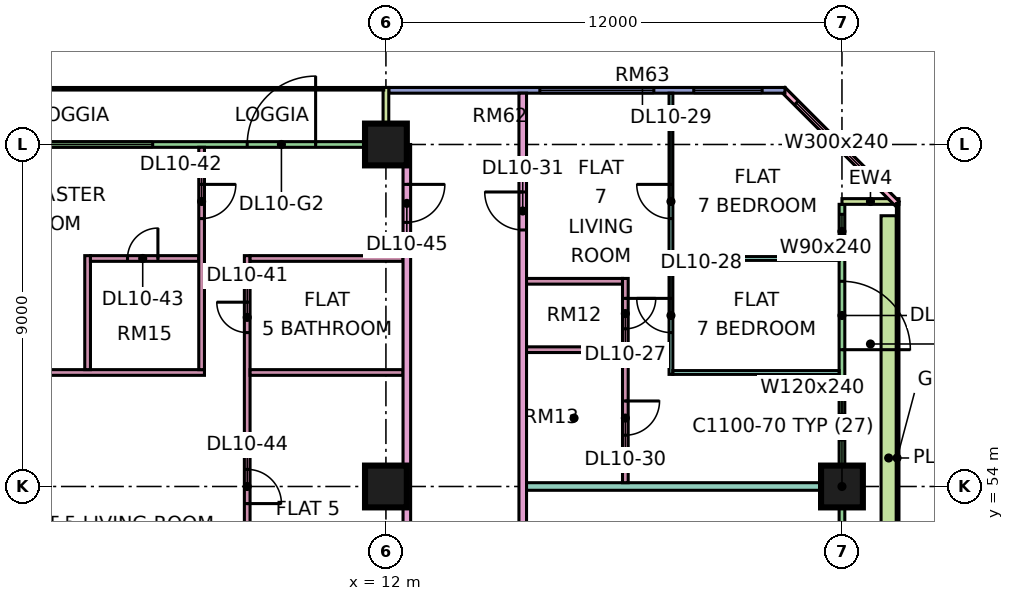
"""IFC4 building model, lengths in metres.
Left out: names, types, materials, properties, quantities, classifications, styles, units other than length and angle.
Written with IfcOpenShell. Run it as: python <this file> out.ifc"""

import sys

from ifc_helpers import new_model, si_unit, direction, frame, frame_2d, origin, origin_2d, place, context, subcontext, project, spatial, rectangle, extrude, element, fill, save


model = new_model("IFC4")
c1 = context("Model", 3, precision=1e-05, world=origin(), true_north=direction((0.0, 1.0)))
c2 = subcontext(c1, "Body", "Model", "MODEL_VIEW")
j1 = project(units=[si_unit("LENGTHUNIT", "METRE"), si_unit("PLANEANGLEUNIT", "RADIAN")], contexts=[c1])
p1 = place(None, origin())
s1 = spatial("IfcSite", under=j1, at=p1, CompositionType="ELEMENT")
p2 = place(p1, origin())
s2 = spatial("IfcBuilding", under=s1, at=p2, CompositionType="ELEMENT")
p3 = place(p2, frame((0.0, 0.0, 52.65)))
s3 = spatial("IfcBuildingStorey", under=s2, at=p3, CompositionType="ELEMENT", Elevation=52.65)
for number, where, z_axis, x_axis in (
    (1, (12.0, 54.0, 0.0), (0.0, 0.0, 1.0), (1.0, 0.0, 0.0)),
    (2, (12.0, 63.0, 0.0), (0.0, 0.0, 1.0), (1.0, 0.0, 0.0)),
    (3, (24.0, 54.0, 0.0), (0.0, 0.0, 1.0), (1.0, 0.0, 0.0)),
):
    element("IfcColumn", number, at=place(p3, frame(where, z_axis=z_axis, x_axis=x_axis)), inside=s3, PredefinedType="COLUMN", context=c2, shape_type="SweptSolid", body=[
        extrude(rectangle(XDim=1.1, YDim=1.1, at=origin_2d()), origin(), (0.0, 0.0, 1.0), 3.75),
    ])
p4 = place(p3, frame((24.0, 48.075, 0.0), z_axis=(0.0, 0.0, 1.0), x_axis=(0.0, 1.0, 0.0)))
e4 = element("IfcWall", 4, at=p4, inside=s3, PredefinedType="SOLIDWALL", context=c2, shape_type="SweptSolid", body=[
    extrude(rectangle(XDim=13.35, YDim=0.15, at=frame_2d((6.675, 0.0))), origin(), (0.0, 0.0, 1.0), 3.35),
])
p5 = place(p4, frame((0.538, 0.0, 0.45)))
e5 = element("IfcOpeningElement", 5, at=p5, cuts=e4, PredefinedType="OPENING", context=c2, shape_type="SweptSolid", body=[
    extrude(rectangle(XDim=4.2, YDim=2.4, at=frame_2d((2.1, 1.2))), frame((0.0, 0.085, 0.0), z_axis=(0.0, -1.0, 0.0), x_axis=(1.0, 0.0, 0.0)), (0.0, 0.0, 1.0), 0.17),
])
p6 = place(p4, frame((7.15, 0.0, 0.45)))
e6 = element("IfcOpeningElement", 6, at=p6, cuts=e4, PredefinedType="OPENING", context=c2, shape_type="SweptSolid", body=[
    extrude(rectangle(XDim=1.2, YDim=2.4, at=frame_2d((0.6, 1.2))), frame((0.0, 0.085, 0.0), z_axis=(0.0, -1.0, 0.0), x_axis=(1.0, 0.0, 0.0)), (0.0, 0.0, 1.0), 0.17),
])
p7 = place(p4, frame((9.525, 0.0, 0.0)))
e7 = element("IfcOpeningElement", 7, at=p7, cuts=e4, PredefinedType="OPENING", context=c2, shape_type="SweptSolid", body=[
    extrude(rectangle(XDim=1.8, YDim=2.4, at=frame_2d((0.9, 1.2))), frame((0.0, 0.085, 0.0), z_axis=(0.0, -1.0, 0.0), x_axis=(1.0, 0.0, 0.0)), (0.0, 0.0, 1.0), 0.17),
])
p8 = place(p4, frame((12.188, 0.0, 0.45)))
e8 = element("IfcOpeningElement", 8, at=p8, cuts=e4, PredefinedType="OPENING", context=c2, shape_type="SweptSolid", body=[
    extrude(rectangle(XDim=0.9, YDim=2.4, at=frame_2d((0.45, 1.2))), frame((0.0, 0.085, 0.0), z_axis=(0.0, -1.0, 0.0), x_axis=(1.0, 0.0, 0.0)), (0.0, 0.0, 1.0), 0.17),
])
p9 = place(p3, frame((25.5, 61.5, 0.0), z_axis=(0.0, 0.0, 1.0), x_axis=(-1.0, 0.0, 0.0)))
e9 = element("IfcWall", 9, at=p9, inside=s3, PredefinedType="SOLIDWALL", context=c2, shape_type="SweptSolid", body=[
    extrude(rectangle(XDim=1.5, YDim=0.15, at=frame_2d((0.75, 0.0))), origin(), (0.0, 0.0, 1.0), 3.35),
])
p10 = place(p3, frame((25.447, 61.447, 0.0), z_axis=(0.0, 0.0, 1.0), x_axis=(-0.707106781187, 0.707106781187, 0.0)))
e10 = element("IfcWall", 10, at=p10, inside=s3, PredefinedType="SOLIDWALL", context=c2, shape_type="SweptSolid", body=[
    extrude(rectangle(XDim=4.243, YDim=0.15, at=frame_2d((2.121, 0.0))), origin(), (0.0, 0.0, 1.0), 3.35),
])
p11 = place(p10, frame((0.744, 0.0, 0.45)))
e11 = element("IfcOpeningElement", 11, at=p11, cuts=e10, PredefinedType="OPENING", context=c2, shape_type="SweptSolid", body=[
    extrude(rectangle(XDim=3.0, YDim=2.4, at=frame_2d((1.5, 1.2))), frame((0.0, 0.085, 0.0), z_axis=(0.0, -1.0, 0.0), x_axis=(1.0, 0.0, 0.0)), (0.0, 0.0, 1.0), 0.17),
])
p12 = place(p3, frame((22.5, 64.425, 0.0), z_axis=(0.0, 0.0, 1.0), x_axis=(-1.0, 0.0, 0.0)))
e12 = element("IfcWall", 12, at=p12, inside=s3, PredefinedType="SOLIDWALL", context=c2, shape_type="SweptSolid", body=[
    extrude(rectangle(XDim=10.425, YDim=0.15, at=frame_2d((5.212, 0.0))), origin(), (0.0, 0.0, 1.0), 3.35),
])
p13 = place(p12, frame((0.6, 0.0, 0.45)))
e13 = element("IfcOpeningElement", 13, at=p13, cuts=e12, PredefinedType="OPENING", context=c2, shape_type="SweptSolid", body=[
    extrude(rectangle(XDim=1.8, YDim=2.4, at=frame_2d((0.9, 1.2))), frame((0.0, 0.085, 0.0), z_axis=(0.0, -1.0, 0.0), x_axis=(1.0, 0.0, 0.0)), (0.0, 0.0, 1.0), 0.17),
])
p14 = place(p12, frame((3.45, 0.0, 0.45)))
e14 = element("IfcOpeningElement", 14, at=p14, cuts=e12, PredefinedType="OPENING", context=c2, shape_type="SweptSolid", body=[
    extrude(rectangle(XDim=3.0, YDim=2.4, at=frame_2d((1.5, 1.2))), frame((0.0, 0.085, 0.0), z_axis=(0.0, -1.0, 0.0), x_axis=(1.0, 0.0, 0.0)), (0.0, 0.0, 1.0), 0.17),
])
p15 = place(p3, frame((11.925, 63.0, 0.0), z_axis=(0.0, 0.0, 1.0), x_axis=(-1.0, 0.0, 0.0)))
e15 = element("IfcWall", 15, at=p15, inside=s3, PredefinedType="SOLIDWALL", context=c2, shape_type="SweptSolid", body=[
    extrude(rectangle(XDim=10.35, YDim=0.15, at=frame_2d((5.175, 0.0))), origin(), (0.0, 0.0, 1.0), 3.35),
])
p16 = place(p15, frame((1.775, 0.0, 0.0)))
e16 = element("IfcOpeningElement", 16, at=p16, cuts=e15, PredefinedType="OPENING", context=c2, shape_type="SweptSolid", body=[
    extrude(rectangle(XDim=1.8, YDim=2.4, at=frame_2d((0.9, 1.2))), frame((0.0, 0.085, 0.0), z_axis=(0.0, -1.0, 0.0), x_axis=(1.0, 0.0, 0.0)), (0.0, 0.0, 1.0), 0.17),
])
p17 = place(p15, frame((6.062, 0.0, 0.45)))
e17 = element("IfcOpeningElement", 17, at=p17, cuts=e15, PredefinedType="OPENING", context=c2, shape_type="SweptSolid", body=[
    extrude(rectangle(XDim=3.0, YDim=2.4, at=frame_2d((1.5, 1.2))), frame((0.0, 0.085, 0.0), z_axis=(0.0, -1.0, 0.0), x_axis=(1.0, 0.0, 0.0)), (0.0, 0.0, 1.0), 0.17),
])
p18 = place(p3, frame((12.0, 64.5, 0.0), z_axis=(0.0, 0.0, 1.0), x_axis=(0.0, -1.0, 0.0)))
e18 = element("IfcWall", 18, at=p18, inside=s3, PredefinedType="SOLIDWALL", context=c2, shape_type="SweptSolid", body=[
    extrude(rectangle(XDim=1.5, YDim=0.15, at=frame_2d((0.75, 0.0))), origin(), (0.0, 0.0, 1.0), 3.35),
])
p19 = place(p3, frame((25.229, 48.375, 0.0), z_axis=(0.0, 0.0, 1.0), x_axis=(0.0, 1.0, 0.0)))
e19 = element("IfcWall", 19, at=p19, inside=s3, PredefinedType="SOLIDWALL", context=c2, shape_type="SweptSolid", body=[
    extrude(rectangle(XDim=12.75, YDim=0.4, at=frame_2d((6.375, 0.0))), origin(), (0.0, 0.0, 1.0), 0.7),
])
p20 = place(p3, frame((0.074, 57.0, 0.0), z_axis=(0.0, 0.0, 1.0), x_axis=(1.0, 0.0, 0.0)))
e20 = element("IfcWall", 20, at=p20, inside=s3, PredefinedType="PARTITIONING", context=c2, shape_type="SweptSolid", body=[
    extrude(rectangle(XDim=7.151, YDim=0.15, at=frame_2d((3.576, 0.0))), origin(), (0.0, 0.0, 1.0), 3.35),
])
p21 = place(p3, frame((4.15, 57.075, 0.0), z_axis=(0.0, 0.0, 1.0), x_axis=(0.0, 1.0, 0.0)))
e21 = element("IfcWall", 21, at=p21, inside=s3, PredefinedType="PARTITIONING", context=c2, shape_type="SweptSolid", body=[
    extrude(rectangle(XDim=3.0, YDim=0.15, at=frame_2d((1.5, 0.0))), origin(), (0.0, 0.0, 1.0), 3.35),
])
p22 = place(p3, frame((4.225, 60.0, 0.0), z_axis=(0.0, 0.0, 1.0), x_axis=(1.0, 0.0, 0.0)))
e22 = element("IfcWall", 22, at=p22, inside=s3, PredefinedType="PARTITIONING", context=c2, shape_type="SweptSolid", body=[
    extrude(rectangle(XDim=2.85, YDim=0.15, at=frame_2d((1.425, 0.0))), origin(), (0.0, 0.0, 1.0), 3.35),
])
p23 = place(p22, frame((0.975, 0.0, 0.0)))
e23 = element("IfcOpeningElement", 23, at=p23, cuts=e22, PredefinedType="OPENING", context=c2, shape_type="SweptSolid", body=[
    extrude(rectangle(XDim=0.8, YDim=2.1, at=frame_2d((0.4, 1.05))), frame((0.0, 0.085, 0.0), z_axis=(0.0, -1.0, 0.0), x_axis=(1.0, 0.0, 0.0)), (0.0, 0.0, 1.0), 0.17),
])
p24 = place(p3, frame((7.15, 57.075, 0.0), z_axis=(0.0, 0.0, 1.0), x_axis=(0.0, 1.0, 0.0)))
e24 = element("IfcWall", 24, at=p24, inside=s3, PredefinedType="PARTITIONING", context=c2, shape_type="SweptSolid", body=[
    extrude(rectangle(XDim=5.851, YDim=0.15, at=frame_2d((2.926, 0.0))), origin(), (0.0, 0.0, 1.0), 3.35),
])
p25 = place(p24, frame((3.975, 0.0, 0.0)))
e25 = element("IfcOpeningElement", 25, at=p25, cuts=e24, PredefinedType="OPENING", context=c2, shape_type="SweptSolid", body=[
    extrude(rectangle(XDim=0.9, YDim=2.1, at=frame_2d((0.45, 1.05))), frame((0.0, 0.085, 0.0), z_axis=(0.0, -1.0, 0.0), x_axis=(1.0, 0.0, 0.0)), (0.0, 0.0, 1.0), 0.17),
])
p26 = place(p3, frame((8.35, 51.1, 0.0), z_axis=(0.0, 0.0, 1.0), x_axis=(0.0, 1.0, 0.0)))
e26 = element("IfcWall", 26, at=p26, inside=s3, PredefinedType="PARTITIONING", context=c2, shape_type="SweptSolid", body=[
    extrude(rectangle(XDim=8.975, YDim=0.15, at=frame_2d((4.487, 0.0))), origin(), (0.0, 0.0, 1.0), 3.35),
])
p27 = place(p26, frame((6.95, 0.0, 0.0)))
e27 = element("IfcOpeningElement", 27, at=p27, cuts=e26, PredefinedType="OPENING", context=c2, shape_type="SweptSolid", body=[
    extrude(rectangle(XDim=0.8, YDim=2.1, at=frame_2d((0.4, 1.05))), frame((0.0, 0.085, 0.0), z_axis=(0.0, -1.0, 0.0), x_axis=(1.0, 0.0, 0.0)), (0.0, 0.0, 1.0), 0.17),
])
p28 = place(p26, frame((2.45, 0.0, 0.0)))
e28 = element("IfcOpeningElement", 28, at=p28, cuts=e26, PredefinedType="OPENING", context=c2, shape_type="SweptSolid", body=[
    extrude(rectangle(XDim=0.9, YDim=2.1, at=frame_2d((0.45, 1.05))), frame((0.0, 0.085, 0.0), z_axis=(0.0, -1.0, 0.0), x_axis=(1.0, 0.0, 0.0)), (0.0, 0.0, 1.0), 0.17),
])
for number, where, z_axis, x_axis in (
    (29, (8.425, 57.0, 0.0), (0.0, 0.0, 1.0), (1.0, 0.0, 0.0)),
    (30, (8.425, 60.0, 0.0), (0.0, 0.0, 1.0), (1.0, 0.0, 0.0)),
):
    element("IfcWall", number, at=place(p3, frame(where, z_axis=z_axis, x_axis=x_axis)), inside=s3, PredefinedType="PARTITIONING", context=c2, shape_type="SweptSolid", body=[
        extrude(rectangle(XDim=4.025, YDim=0.15, at=frame_2d((2.012, 0.0))), origin(), (0.0, 0.0, 1.0), 3.35),
    ])
p29 = place(p3, frame((12.55, 39.225, 0.0), z_axis=(0.0, 0.0, 1.0), x_axis=(0.0, 1.0, 0.0)))
e31 = element("IfcWall", 31, at=p29, inside=s3, PredefinedType="PARTITIONING", context=c2, shape_type="SweptSolid", body=[
    extrude(rectangle(XDim=23.775, YDim=0.2, at=frame_2d((11.887, 0.0))), origin(), (0.0, 0.0, 1.0), 3.35),
])
p30 = place(p29, frame((3.725, 0.0, 0.0)))
e32 = element("IfcOpeningElement", 32, at=p30, cuts=e31, PredefinedType="OPENING", context=c2, shape_type="SweptSolid", body=[
    extrude(rectangle(XDim=1.0, YDim=2.1, at=frame_2d((0.5, 1.05))), frame((0.0, 0.11, 0.0), z_axis=(0.0, -1.0, 0.0), x_axis=(1.0, 0.0, 0.0)), (0.0, 0.0, 1.0), 0.22),
])
p31 = place(p29, frame((21.725, 0.0, 0.0)))
e33 = element("IfcOpeningElement", 33, at=p31, cuts=e31, PredefinedType="OPENING", context=c2, shape_type="SweptSolid", body=[
    extrude(rectangle(XDim=1.0, YDim=2.1, at=frame_2d((0.5, 1.05))), frame((0.0, 0.11, 0.0), z_axis=(0.0, -1.0, 0.0), x_axis=(1.0, 0.0, 0.0)), (0.0, 0.0, 1.0), 0.22),
])
p32 = place(p3, frame((15.6, 51.225, 0.0), z_axis=(0.0, 0.0, 1.0), x_axis=(0.0, 1.0, 0.0)))
e34 = element("IfcWall", 34, at=p32, inside=s3, PredefinedType="PARTITIONING", context=c2, shape_type="SweptSolid", body=[
    extrude(rectangle(XDim=13.125, YDim=0.2, at=frame_2d((6.562, 0.0))), origin(), (0.0, 0.0, 1.0), 3.35),
])
p33 = place(p32, frame((9.525, 0.0, 0.0)))
e35 = element("IfcOpeningElement", 35, at=p33, cuts=e34, PredefinedType="OPENING", context=c2, shape_type="SweptSolid", body=[
    extrude(rectangle(XDim=1.0, YDim=2.1, at=frame_2d((0.5, 1.05))), frame((0.0, 0.11, 0.0), z_axis=(0.0, -1.0, 0.0), x_axis=(1.0, 0.0, 0.0)), (0.0, 0.0, 1.0), 0.22),
])
p34 = place(p3, frame((15.7, 54.0, 0.0), z_axis=(0.0, 0.0, 1.0), x_axis=(1.0, 0.0, 0.0)))
e36 = element("IfcWall", 36, at=p34, inside=s3, PredefinedType="PARTITIONING", context=c2, shape_type="SweptSolid", body=[
    extrude(rectangle(XDim=8.226, YDim=0.2, at=frame_2d((4.113, 0.0))), origin(), (0.0, 0.0, 1.0), 3.35),
])
for number, where, z_axis, x_axis in (
    (37, (15.7, 57.6, 0.0), (0.0, 0.0, 1.0), (1.0, 0.0, 0.0)),
    (38, (15.7, 59.4, 0.0), (0.0, 0.0, 1.0), (1.0, 0.0, 0.0)),
):
    element("IfcWall", number, at=place(p3, frame(where, z_axis=z_axis, x_axis=x_axis)), inside=s3, PredefinedType="PARTITIONING", context=c2, shape_type="SweptSolid", body=[
        extrude(rectangle(XDim=2.525, YDim=0.15, at=frame_2d((1.263, 0.0))), origin(), (0.0, 0.0, 1.0), 3.35),
    ])
p35 = place(p3, frame((18.3, 54.1, 0.0), z_axis=(0.0, 0.0, 1.0), x_axis=(0.0, 1.0, 0.0)))
e39 = element("IfcWall", 39, at=p35, inside=s3, PredefinedType="PARTITIONING", context=c2, shape_type="SweptSolid", body=[
    extrude(rectangle(XDim=5.375, YDim=0.15, at=frame_2d((2.688, 0.0))), origin(), (0.0, 0.0, 1.0), 3.35),
])
p36 = place(p35, frame((4.05, 0.0, 0.0)))
e40 = element("IfcOpeningElement", 40, at=p36, cuts=e39, PredefinedType="OPENING", context=c2, shape_type="SweptSolid", body=[
    extrude(rectangle(XDim=0.8, YDim=2.1, at=frame_2d((0.4, 1.05))), frame((0.0, 0.085, 0.0), z_axis=(0.0, -1.0, 0.0), x_axis=(1.0, 0.0, 0.0)), (0.0, 0.0, 1.0), 0.17),
])
p37 = place(p35, frame((1.25, 0.0, 0.0)))
e41 = element("IfcOpeningElement", 41, at=p37, cuts=e39, PredefinedType="OPENING", context=c2, shape_type="SweptSolid", body=[
    extrude(rectangle(XDim=0.9, YDim=2.1, at=frame_2d((0.45, 1.05))), frame((0.0, 0.085, 0.0), z_axis=(0.0, -1.0, 0.0), x_axis=(1.0, 0.0, 0.0)), (0.0, 0.0, 1.0), 0.17),
])
p38 = place(p3, frame((19.5, 56.95, 0.0), z_axis=(0.0, 0.0, 1.0), x_axis=(0.0, 1.0, 0.0)))
e42 = element("IfcWall", 42, at=p38, inside=s3, PredefinedType="PARTITIONING", context=c2, shape_type="SweptSolid", body=[
    extrude(rectangle(XDim=7.4, YDim=0.1, at=frame_2d((3.7, 0.0))), origin(), (0.0, 0.0, 1.0), 3.35),
])
p39 = place(p38, frame((1.1, 0.0, 0.0)))
e43 = element("IfcOpeningElement", 43, at=p39, cuts=e42, PredefinedType="OPENING", context=c2, shape_type="SweptSolid", body=[
    extrude(rectangle(XDim=0.9, YDim=2.1, at=frame_2d((0.45, 1.05))), frame((0.0, 0.06, 0.0), z_axis=(0.0, -1.0, 0.0), x_axis=(1.0, 0.0, 0.0)), (0.0, 0.0, 1.0), 0.12),
])
p40 = place(p38, frame((4.1, 0.0, 0.0)))
e44 = element("IfcOpeningElement", 44, at=p40, cuts=e42, PredefinedType="OPENING", context=c2, shape_type="SweptSolid", body=[
    extrude(rectangle(XDim=0.9, YDim=2.1, at=frame_2d((0.45, 1.05))), frame((0.0, 0.06, 0.0), z_axis=(0.0, -1.0, 0.0), x_axis=(1.0, 0.0, 0.0)), (0.0, 0.0, 1.0), 0.12),
])
for number, where, z_axis, x_axis in (
    (45, (19.55, 57.0, 0.0), (0.0, 0.0, 1.0), (1.0, 0.0, 0.0)),
    (46, (19.55, 60.0, 0.0), (0.0, 0.0, 1.0), (1.0, 0.0, 0.0)),
):
    element("IfcWall", number, at=place(p3, frame(where, z_axis=z_axis, x_axis=x_axis)), inside=s3, PredefinedType="PARTITIONING", context=c2, shape_type="SweptSolid", body=[
        extrude(rectangle(XDim=4.376, YDim=0.1, at=frame_2d((2.188, 0.0))), origin(), (0.0, 0.0, 1.0), 3.35),
    ])
p41 = place(p6, origin())
e47 = element("IfcWindow", 47, at=p41, inside=s3, PartitioningType="SINGLE_PANEL", PredefinedType="WINDOW", context=c2, shape_type="SweptSolid", body=[
    extrude(rectangle(XDim=1.2, YDim=2.4, at=frame_2d((0.6, 1.2))), frame((0.0, 0.03, 0.0), z_axis=(0.0, -1.0, 0.0), x_axis=(1.0, 0.0, 0.0)), (0.0, 0.0, 1.0), 0.06),
])
fill(e6, e47)
p42 = place(p7, frame((1.8, 0.0, 0.0), z_axis=(0.0, 0.0, 1.0), x_axis=(-1.0, 0.0, 0.0)))
e48 = element("IfcDoor", 48, at=p42, inside=s3, OperationType="DOUBLE_DOOR_SINGLE_SWING", PredefinedType="DOOR", context=c2, shape_type="SweptSolid", body=[
    extrude(rectangle(XDim=1.8, YDim=2.4, at=frame_2d((0.9, 1.2))), frame((0.0, 0.025, 0.0), z_axis=(0.0, -1.0, 0.0), x_axis=(1.0, 0.0, 0.0)), (0.0, 0.0, 1.0), 0.05),
])
fill(e7, e48)
p43 = place(p8, origin())
e49 = element("IfcWindow", 49, at=p43, inside=s3, PartitioningType="SINGLE_PANEL", PredefinedType="WINDOW", context=c2, shape_type="SweptSolid", body=[
    extrude(rectangle(XDim=0.9, YDim=2.4, at=frame_2d((0.45, 1.2))), frame((0.0, 0.03, 0.0), z_axis=(0.0, -1.0, 0.0), x_axis=(1.0, 0.0, 0.0)), (0.0, 0.0, 1.0), 0.06),
])
fill(e8, e49)
p44 = place(p11, origin())
e50 = element("IfcWindow", 50, at=p44, inside=s3, PartitioningType="SINGLE_PANEL", PredefinedType="WINDOW", context=c2, shape_type="SweptSolid", body=[
    extrude(rectangle(XDim=3.0, YDim=2.4, at=frame_2d((1.5, 1.2))), frame((0.0, 0.03, 0.0), z_axis=(0.0, -1.0, 0.0), x_axis=(1.0, 0.0, 0.0)), (0.0, 0.0, 1.0), 0.06),
])
fill(e11, e50)
p45 = place(p13, origin())
e51 = element("IfcWindow", 51, at=p45, inside=s3, PartitioningType="SINGLE_PANEL", PredefinedType="WINDOW", context=c2, shape_type="SweptSolid", body=[
    extrude(rectangle(XDim=1.8, YDim=2.4, at=frame_2d((0.9, 1.2))), frame((0.0, 0.03, 0.0), z_axis=(0.0, -1.0, 0.0), x_axis=(1.0, 0.0, 0.0)), (0.0, 0.0, 1.0), 0.06),
])
fill(e13, e51)
p46 = place(p14, origin())
e52 = element("IfcWindow", 52, at=p46, inside=s3, PartitioningType="SINGLE_PANEL", PredefinedType="WINDOW", context=c2, shape_type="SweptSolid", body=[
    extrude(rectangle(XDim=3.0, YDim=2.4, at=frame_2d((1.5, 1.2))), frame((0.0, 0.03, 0.0), z_axis=(0.0, -1.0, 0.0), x_axis=(1.0, 0.0, 0.0)), (0.0, 0.0, 1.0), 0.06),
])
fill(e14, e52)
p47 = place(p16, frame((1.8, 0.0, 0.0), z_axis=(0.0, 0.0, 1.0), x_axis=(-1.0, 0.0, 0.0)))
e53 = element("IfcDoor", 53, at=p47, inside=s3, OperationType="DOUBLE_DOOR_SINGLE_SWING", PredefinedType="DOOR", context=c2, shape_type="SweptSolid", body=[
    extrude(rectangle(XDim=1.8, YDim=2.4, at=frame_2d((0.9, 1.2))), frame((0.0, 0.025, 0.0), z_axis=(0.0, -1.0, 0.0), x_axis=(1.0, 0.0, 0.0)), (0.0, 0.0, 1.0), 0.05),
])
fill(e16, e53)
p48 = place(p17, origin())
e54 = element("IfcWindow", 54, at=p48, inside=s3, PartitioningType="SINGLE_PANEL", PredefinedType="WINDOW", context=c2, shape_type="SweptSolid", body=[
    extrude(rectangle(XDim=3.0, YDim=2.4, at=frame_2d((1.5, 1.2))), frame((0.0, 0.03, 0.0), z_axis=(0.0, -1.0, 0.0), x_axis=(1.0, 0.0, 0.0)), (0.0, 0.0, 1.0), 0.06),
])
fill(e17, e54)
p49 = place(p36, origin())
e55 = element("IfcDoor", 55, at=p49, inside=s3, OperationType="SINGLE_SWING_RIGHT", PredefinedType="DOOR", context=c2, shape_type="SweptSolid", body=[
    extrude(rectangle(XDim=0.8, YDim=2.1, at=frame_2d((0.4, 1.05))), frame((0.0, 0.025, 0.0), z_axis=(0.0, -1.0, 0.0), x_axis=(1.0, 0.0, 0.0)), (0.0, 0.0, 1.0), 0.05),
])
fill(e40, e55)
p50 = place(p39, frame((0.9, 0.0, 0.0), z_axis=(0.0, 0.0, 1.0), x_axis=(-1.0, 0.0, 0.0)))
e56 = element("IfcDoor", 56, at=p50, inside=s3, OperationType="SINGLE_SWING_RIGHT", PredefinedType="DOOR", context=c2, shape_type="SweptSolid", body=[
    extrude(rectangle(XDim=0.9, YDim=2.1, at=frame_2d((0.45, 1.05))), frame((0.0, 0.025, 0.0), z_axis=(0.0, -1.0, 0.0), x_axis=(1.0, 0.0, 0.0)), (0.0, 0.0, 1.0), 0.05),
])
fill(e43, e56)
p51 = place(p40, frame((0.9, 0.0, 0.0), z_axis=(0.0, 0.0, 1.0), x_axis=(-1.0, 0.0, 0.0)))
e57 = element("IfcDoor", 57, at=p51, inside=s3, OperationType="SINGLE_SWING_RIGHT", PredefinedType="DOOR", context=c2, shape_type="SweptSolid", body=[
    extrude(rectangle(XDim=0.9, YDim=2.1, at=frame_2d((0.45, 1.05))), frame((0.0, 0.025, 0.0), z_axis=(0.0, -1.0, 0.0), x_axis=(1.0, 0.0, 0.0)), (0.0, 0.0, 1.0), 0.05),
])
fill(e44, e57)
p52 = place(p37, origin())
e58 = element("IfcDoor", 58, at=p52, inside=s3, OperationType="SINGLE_SWING_RIGHT", PredefinedType="DOOR", context=c2, shape_type="SweptSolid", body=[
    extrude(rectangle(XDim=0.9, YDim=2.1, at=frame_2d((0.45, 1.05))), frame((0.0, 0.025, 0.0), z_axis=(0.0, -1.0, 0.0), x_axis=(1.0, 0.0, 0.0)), (0.0, 0.0, 1.0), 0.05),
])
fill(e41, e58)
p53 = place(p33, frame((1.0, 0.0, 0.0), z_axis=(0.0, 0.0, 1.0), x_axis=(-1.0, 0.0, 0.0)))
e59 = element("IfcDoor", 59, at=p53, inside=s3, OperationType="SINGLE_SWING_RIGHT", PredefinedType="DOOR", context=c2, shape_type="SweptSolid", body=[
    extrude(rectangle(XDim=1.0, YDim=2.1, at=frame_2d((0.5, 1.05))), frame((0.0, 0.025, 0.0), z_axis=(0.0, -1.0, 0.0), x_axis=(1.0, 0.0, 0.0)), (0.0, 0.0, 1.0), 0.05),
])
fill(e35, e59)
p54 = place(p27, frame((0.8, 0.0, 0.0), z_axis=(0.0, 0.0, 1.0), x_axis=(-1.0, 0.0, 0.0)))
e60 = element("IfcDoor", 60, at=p54, inside=s3, OperationType="SINGLE_SWING_RIGHT", PredefinedType="DOOR", context=c2, shape_type="SweptSolid", body=[
    extrude(rectangle(XDim=0.8, YDim=2.1, at=frame_2d((0.4, 1.05))), frame((0.0, 0.025, 0.0), z_axis=(0.0, -1.0, 0.0), x_axis=(1.0, 0.0, 0.0)), (0.0, 0.0, 1.0), 0.05),
])
fill(e27, e60)
p55 = place(p25, origin())
e61 = element("IfcDoor", 61, at=p55, inside=s3, OperationType="SINGLE_SWING_RIGHT", PredefinedType="DOOR", context=c2, shape_type="SweptSolid", body=[
    extrude(rectangle(XDim=0.9, YDim=2.1, at=frame_2d((0.45, 1.05))), frame((0.0, 0.025, 0.0), z_axis=(0.0, -1.0, 0.0), x_axis=(1.0, 0.0, 0.0)), (0.0, 0.0, 1.0), 0.05),
])
fill(e25, e61)
p56 = place(p23, frame((0.8, 0.0, 0.0), z_axis=(0.0, 0.0, 1.0), x_axis=(-1.0, 0.0, 0.0)))
e62 = element("IfcDoor", 62, at=p56, inside=s3, OperationType="SINGLE_SWING_RIGHT", PredefinedType="DOOR", context=c2, shape_type="SweptSolid", body=[
    extrude(rectangle(XDim=0.8, YDim=2.1, at=frame_2d((0.4, 1.05))), frame((0.0, 0.025, 0.0), z_axis=(0.0, -1.0, 0.0), x_axis=(1.0, 0.0, 0.0)), (0.0, 0.0, 1.0), 0.05),
])
fill(e23, e62)
p57 = place(p28, frame((0.9, 0.0, 0.0), z_axis=(0.0, 0.0, 1.0), x_axis=(-1.0, 0.0, 0.0)))
e63 = element("IfcDoor", 63, at=p57, inside=s3, OperationType="SINGLE_SWING_LEFT", PredefinedType="DOOR", context=c2, shape_type="SweptSolid", body=[
    extrude(rectangle(XDim=0.9, YDim=2.1, at=frame_2d((0.45, 1.05))), frame((0.0, 0.025, 0.0), z_axis=(0.0, -1.0, 0.0), x_axis=(1.0, 0.0, 0.0)), (0.0, 0.0, 1.0), 0.05),
])
fill(e28, e63)
p58 = place(p31, origin())
e64 = element("IfcDoor", 64, at=p58, inside=s3, OperationType="SINGLE_SWING_RIGHT", PredefinedType="DOOR", context=c2, shape_type="SweptSolid", body=[
    extrude(rectangle(XDim=1.0, YDim=2.1, at=frame_2d((0.5, 1.05))), frame((0.0, 0.025, 0.0), z_axis=(0.0, -1.0, 0.0), x_axis=(1.0, 0.0, 0.0)), (0.0, 0.0, 1.0), 0.05),
])
fill(e33, e64)
save(model, sys.argv[1])
